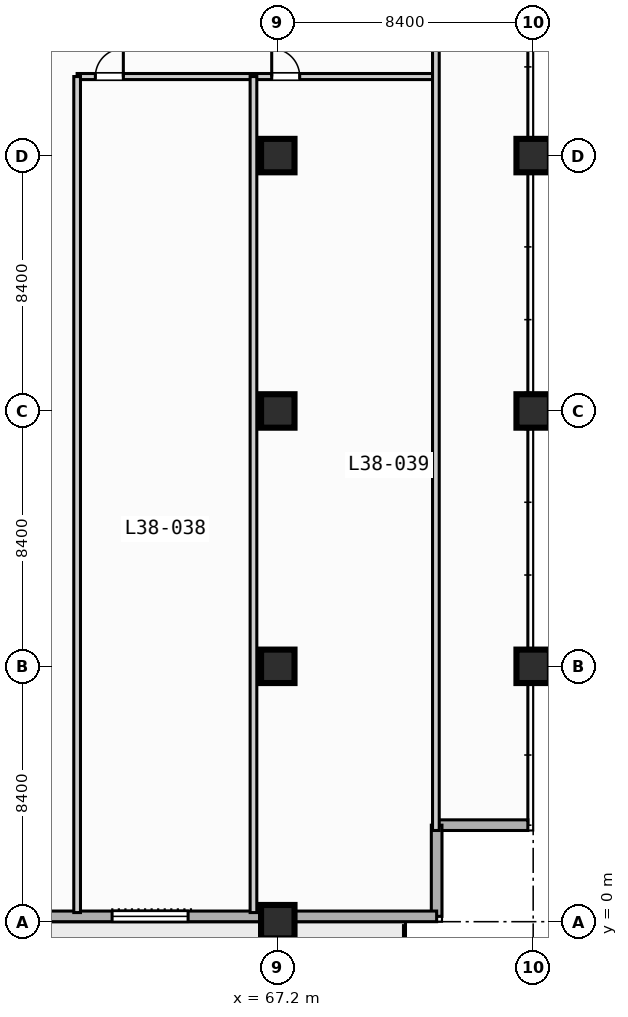
"""IFC4 building model, lengths in metres.
Left out: names, types, materials, properties, quantities, classifications, styles, units other than length and angle.
Written with IfcOpenShell. Run it as: python <this file> out.ifc"""

import sys

from ifc_helpers import new_model, si_unit, direction, frame, frame_2d, origin, origin_2d, place, context, subcontext, project, spatial, rectangle, extrude, element, fill, save


model = new_model("IFC4")
c1 = context("Model", 3, precision=1e-05, world=origin(), true_north=direction((0.0, 1.0)))
c2 = subcontext(c1, "Body", "Model", "MODEL_VIEW")
j1 = project(units=[si_unit("LENGTHUNIT", "METRE"), si_unit("PLANEANGLEUNIT", "RADIAN")], contexts=[c1])
p1 = place(None, origin())
s1 = spatial("IfcSite", under=j1, at=p1, CompositionType="ELEMENT")
p2 = place(p1, origin())
s2 = spatial("IfcBuilding", under=s1, at=p2, CompositionType="ELEMENT")
p3 = place(p2, frame((0.0, 0.0, 157.6)))
s3 = spatial("IfcBuildingStorey", under=s2, at=p3, CompositionType="ELEMENT", Elevation=157.6)
for number, where, z_axis, x_axis in (
    (1, (67.2, 0.0, 0.0), (0.0, 0.0, 1.0), (1.0, 0.0, 0.0)),
    (2, (67.2, 8.4, 0.0), (0.0, 0.0, 1.0), (1.0, 0.0, 0.0)),
    (3, (67.2, 16.8, 0.0), (0.0, 0.0, 1.0), (1.0, 0.0, 0.0)),
    (4, (67.2, 25.2, 0.0), (0.0, 0.0, 1.0), (1.0, 0.0, 0.0)),
    (5, (75.6, 8.4, 0.0), (0.0, 0.0, 1.0), (1.0, 0.0, 0.0)),
    (6, (75.6, 16.8, 0.0), (0.0, 0.0, 1.0), (1.0, 0.0, 0.0)),
    (7, (75.6, 25.2, 0.0), (0.0, 0.0, 1.0), (1.0, 0.0, 0.0)),
):
    element("IfcColumn", number, at=place(p3, frame(where, z_axis=z_axis, x_axis=x_axis)), inside=s3, PredefinedType="COLUMN", context=c2, shape_type="SweptSolid", body=[
        extrude(rectangle(XDim=1.1, YDim=1.1, at=origin_2d()), origin(), (0.0, 0.0, 1.0), 4.4),
    ])
for number, where, z_axis, x_axis in (
    (8, (75.425, 3.175, 0.0), (0.0, 0.0, 1.0), (-1.0, 0.0, 0.0)),
    (9, (72.425, 3.175, 0.0), (0.0, 0.0, 1.0), (0.0, -1.0, 0.0)),
):
    element("IfcWall", number, at=place(p3, frame(where, z_axis=z_axis, x_axis=x_axis)), inside=s3, PredefinedType="STANDARD", context=c2, shape_type="SweptSolid", body=[
        extrude(rectangle(XDim=3.0, YDim=0.35, at=frame_2d((1.5, 0.0))), origin(), (0.0, 0.0, 1.0), 4.05),
    ])
p4 = place(p3, frame((72.425, 0.175, 0.0), z_axis=(0.0, 0.0, 1.0), x_axis=(-1.0, 0.0, 0.0)))
e10 = element("IfcWall", 10, at=p4, inside=s3, PredefinedType="STANDARD", context=c2, shape_type="SweptSolid", body=[
    extrude(rectangle(XDim=69.25, YDim=0.35, at=frame_2d((34.625, 0.0))), origin(), (0.0, 0.0, 1.0), 4.05),
])
p5 = place(p4, frame((50.725, 0.0, 0.0)))
e11 = element("IfcOpeningElement", 11, at=p5, cuts=e10, PredefinedType="OPENING", context=c2, shape_type="SweptSolid", body=[
    extrude(rectangle(XDim=1.4, YDim=2.2, at=frame_2d((0.7, 1.1))), frame((0.0, 0.185, 0.0), z_axis=(0.0, -1.0, 0.0), x_axis=(1.0, 0.0, 0.0)), (0.0, 0.0, 1.0), 0.37),
])
p6 = place(p4, frame((24.975, 0.0, 0.85)))
e12 = element("IfcOpeningElement", 12, at=p6, cuts=e10, PredefinedType="OPENING", context=c2, shape_type="SweptSolid", body=[
    extrude(rectangle(XDim=2.5, YDim=2.2, at=frame_2d((1.25, 1.1))), frame((0.0, 0.185, 0.0), z_axis=(0.0, -1.0, 0.0), x_axis=(1.0, 0.0, 0.0)), (0.0, 0.0, 1.0), 0.37),
])
p7 = place(p4, frame((8.175, 0.0, 0.85)))
e13 = element("IfcOpeningElement", 13, at=p7, cuts=e10, PredefinedType="OPENING", context=c2, shape_type="SweptSolid", body=[
    extrude(rectangle(XDim=2.5, YDim=2.2, at=frame_2d((1.25, 1.1))), frame((0.0, 0.185, 0.0), z_axis=(0.0, -1.0, 0.0), x_axis=(1.0, 0.0, 0.0)), (0.0, 0.0, 1.0), 0.37),
])
p8 = place(p3, frame((60.6, 27.8, 0.0), z_axis=(0.0, 0.0, 1.0), x_axis=(1.0, 0.0, 0.0)))
e14 = element("IfcWall", 14, at=p8, inside=s3, PredefinedType="PARTITIONING", context=c2, shape_type="SweptSolid", body=[
    extrude(rectangle(XDim=11.8, YDim=0.2, at=frame_2d((5.9, 0.0))), origin(), (0.0, 0.0, 1.0), 4.05),
])
p9 = place(p8, frame((0.6, 0.0, 0.0)))
e15 = element("IfcOpeningElement", 15, at=p9, cuts=e14, PredefinedType="OPENING", context=c2, shape_type="SweptSolid", body=[
    extrude(rectangle(XDim=0.92, YDim=2.1, at=frame_2d((0.46, 1.05))), frame((0.0, 0.11, 0.0), z_axis=(0.0, -1.0, 0.0), x_axis=(1.0, 0.0, 0.0)), (0.0, 0.0, 1.0), 0.22),
])
p10 = place(p8, frame((6.4, 0.0, 0.0)))
e16 = element("IfcOpeningElement", 16, at=p10, cuts=e14, PredefinedType="OPENING", context=c2, shape_type="SweptSolid", body=[
    extrude(rectangle(XDim=0.92, YDim=2.1, at=frame_2d((0.46, 1.05))), frame((0.0, 0.11, 0.0), z_axis=(0.0, -1.0, 0.0), x_axis=(1.0, 0.0, 0.0)), (0.0, 0.0, 1.0), 0.22),
])
p11 = place(p3, frame((60.6, 0.3, 0.0), z_axis=(0.0, 0.0, 1.0), x_axis=(0.0, 1.0, 0.0)))
e17 = element("IfcWall", 17, at=p11, inside=s3, PredefinedType="PARTITIONING", context=c2, shape_type="SweptSolid", body=[
    extrude(rectangle(XDim=27.5, YDim=0.22, at=frame_2d((13.75, 0.0))), origin(), (0.0, 0.0, 1.0), 4.05),
])
p12 = place(p3, frame((72.4, 3.0, 0.0), z_axis=(0.0, 0.0, 1.0), x_axis=(0.0, 1.0, 0.0)))
e18 = element("IfcWall", 18, at=p12, inside=s3, PredefinedType="PARTITIONING", context=c2, shape_type="SweptSolid", body=[
    extrude(rectangle(XDim=27.4, YDim=0.22, at=frame_2d((13.7, 0.0))), origin(), (0.0, 0.0, 1.0), 4.05),
])
p13 = place(p3, frame((66.4, 0.3, 0.0), z_axis=(0.0, 0.0, 1.0), x_axis=(0.0, 1.0, 0.0)))
e19 = element("IfcWall", 19, at=p13, inside=s3, PredefinedType="PARTITIONING", context=c2, shape_type="SweptSolid", body=[
    extrude(rectangle(XDim=27.5, YDim=0.22, at=frame_2d((13.75, 0.0))), origin(), (0.0, 0.0, 1.0), 4.05),
])
p14 = place(p7, origin())
e20 = element("IfcWindow", 20, at=p14, inside=s3, PartitioningType="SINGLE_PANEL", PredefinedType="WINDOW", context=c2, shape_type="SweptSolid", body=[
    extrude(rectangle(XDim=2.5, YDim=2.2, at=frame_2d((1.25, 1.1))), frame((0.0, 0.03, 0.0), z_axis=(0.0, -1.0, 0.0), x_axis=(1.0, 0.0, 0.0)), (0.0, 0.0, 1.0), 0.06),
])
fill(e13, e20)
p15 = place(p9, origin())
e21 = element("IfcDoor", 21, at=p15, inside=s3, OperationType="SINGLE_SWING_RIGHT", PredefinedType="DOOR", context=c2, shape_type="SweptSolid", body=[
    extrude(rectangle(XDim=0.92, YDim=2.1, at=frame_2d((0.46, 1.05))), frame((0.0, 0.025, 0.0), z_axis=(0.0, -1.0, 0.0), x_axis=(1.0, 0.0, 0.0)), (0.0, 0.0, 1.0), 0.05),
])
fill(e15, e21)
p16 = place(p10, origin())
e22 = element("IfcDoor", 22, at=p16, inside=s3, OperationType="SINGLE_SWING_LEFT", PredefinedType="DOOR", context=c2, shape_type="SweptSolid", body=[
    extrude(rectangle(XDim=0.92, YDim=2.1, at=frame_2d((0.46, 1.05))), frame((0.0, 0.025, 0.0), z_axis=(0.0, -1.0, 0.0), x_axis=(1.0, 0.0, 0.0)), (0.0, 0.0, 1.0), 0.05),
])
fill(e16, e22)
save(model, sys.argv[1])
